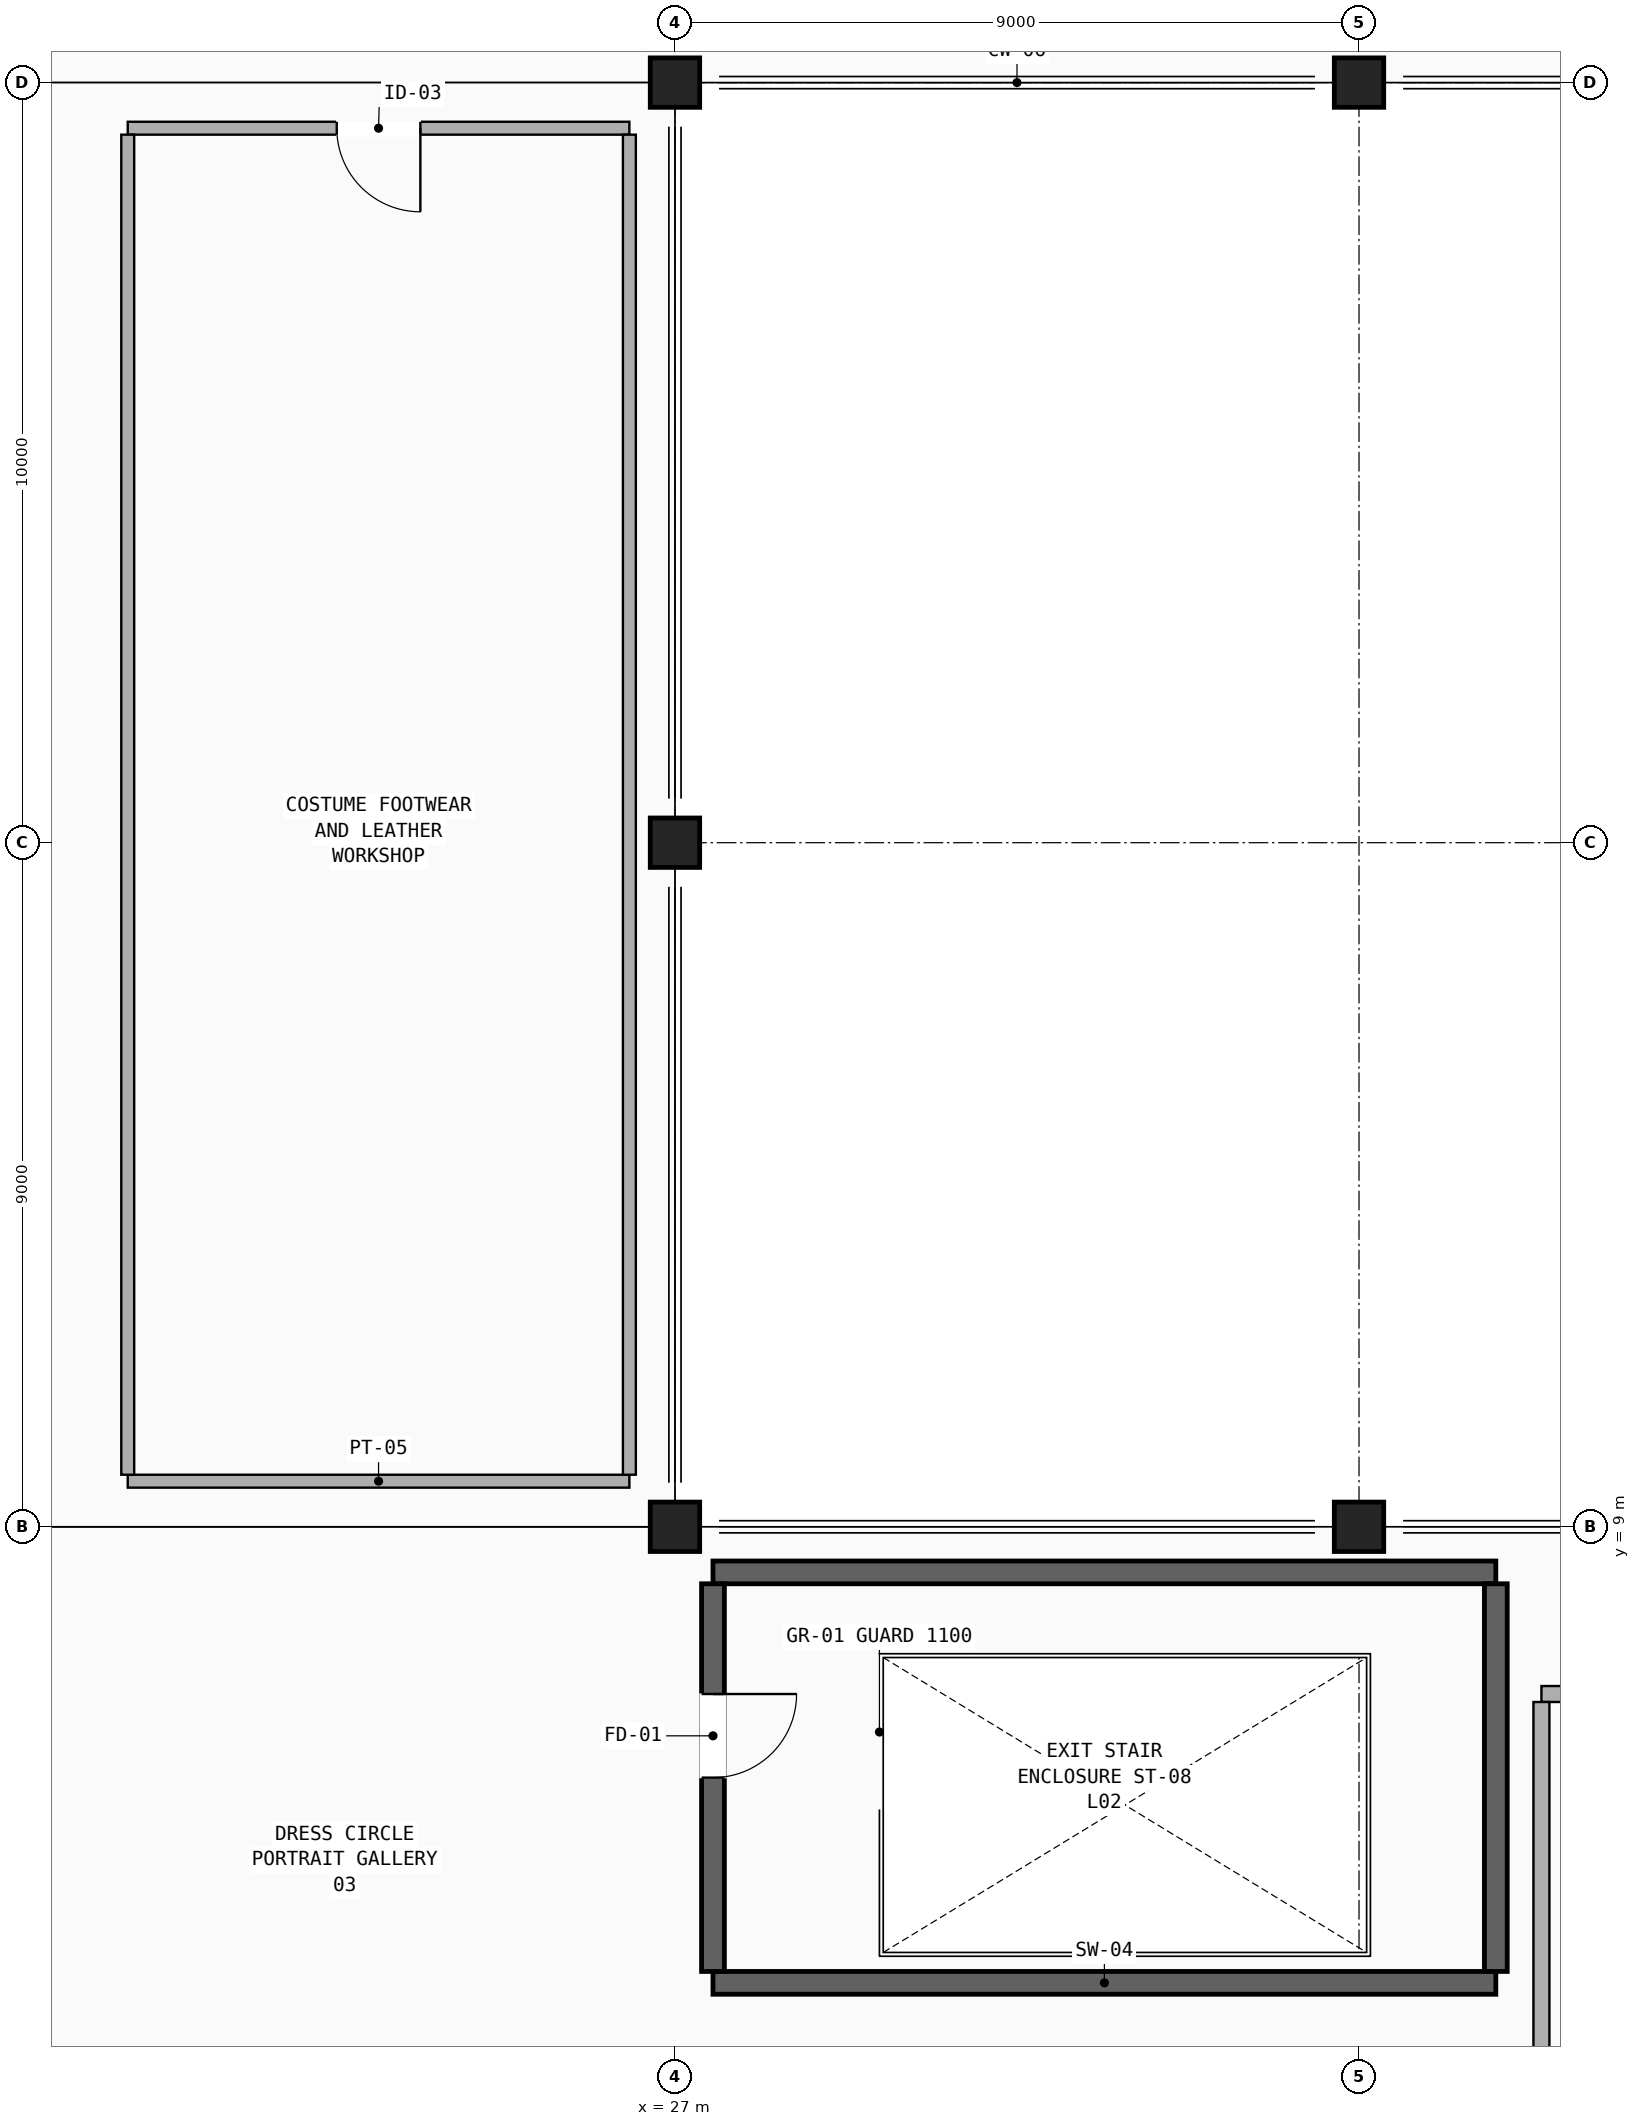
"""IFC4 building model, lengths in metres.
Left out: names, types, materials, properties, quantities, classifications, styles, units other than length and angle.
Written with IfcOpenShell. Run it as: python <this file> out.ifc"""

import sys

from ifc_helpers import new_model, si_unit, direction, frame, frame_2d, origin, origin_2d, place, context, subcontext, project, spatial, rectangle, extrude, element, fill, save


model = new_model("IFC4")
c1 = context("Model", 3, precision=1e-05, world=origin(), true_north=direction((0.0, 1.0)))
c2 = subcontext(c1, "Body", "Model", "MODEL_VIEW")
j1 = project(units=[si_unit("LENGTHUNIT", "METRE"), si_unit("PLANEANGLEUNIT", "RADIAN")], contexts=[c1])
p1 = place(None, origin())
s1 = spatial("IfcSite", under=j1, at=p1, CompositionType="ELEMENT")
p2 = place(p1, origin())
s2 = spatial("IfcBuilding", under=s1, at=p2, CompositionType="ELEMENT")
p3 = place(p2, frame((0.0, 0.0, 9.52)))
s3 = spatial("IfcBuildingStorey", under=s2, at=p3, CompositionType="ELEMENT", Elevation=9.52)
for number, where, z_axis, x_axis in (
    (1, (27.0, 9.0, 0.0), (0.0, 0.0, 1.0), (1.0, 0.0, 0.0)),
    (2, (27.0, 18.0, 0.0), (0.0, 0.0, 1.0), (1.0, 0.0, 0.0)),
    (3, (27.0, 28.0, 0.0), (0.0, 0.0, 1.0), (1.0, 0.0, 0.0)),
    (4, (36.0, 9.0, 0.0), (0.0, 0.0, 1.0), (1.0, 0.0, 0.0)),
    (5, (36.0, 28.0, 0.0), (0.0, 0.0, 1.0), (1.0, 0.0, 0.0)),
):
    element("IfcColumn", number, at=place(p3, frame(where, z_axis=z_axis, x_axis=x_axis)), inside=s3, PredefinedType="COLUMN", context=c2, shape_type="SweptSolid", body=[
        extrude(rectangle(XDim=0.65, YDim=0.65, at=origin_2d()), origin(), (0.0, 0.0, 1.0), 4.08),
    ])
for number, where, z_axis, x_axis in (
    (6, (27.5, 3.0, 0.0), (0.0, 0.0, 1.0), (1.0, 0.0, 0.0)),
    (7, (27.5, 8.4, 0.0), (0.0, 0.0, 1.0), (1.0, 0.0, 0.0)),
):
    element("IfcWall", number, at=place(p3, frame(where, z_axis=z_axis, x_axis=x_axis)), inside=s3, PredefinedType="SHEAR", context=c2, shape_type="SweptSolid", body=[
        extrude(rectangle(XDim=10.3, YDim=0.3, at=frame_2d((5.15, 0.0))), origin(), (0.0, 0.0, 1.0), 4.08),
    ])
p4 = place(p3, frame((27.5, 3.15, 0.0), z_axis=(0.0, 0.0, 1.0), x_axis=(0.0, 1.0, 0.0)))
e8 = element("IfcWall", 8, at=p4, inside=s3, PredefinedType="SHEAR", context=c2, shape_type="SweptSolid", body=[
    extrude(rectangle(XDim=5.1, YDim=0.3, at=frame_2d((2.55, 0.0))), origin(), (0.0, 0.0, 1.0), 4.08),
])
p5 = place(p4, frame((2.55, 0.0, 0.0)))
e9 = element("IfcOpeningElement", 9, at=p5, cuts=e8, PredefinedType="OPENING", context=c2, shape_type="SweptSolid", body=[
    extrude(rectangle(XDim=1.1, YDim=2.2, at=frame_2d((0.55, 1.1))), frame((0.0, 0.16, 0.0), z_axis=(0.0, -1.0, 0.0), x_axis=(1.0, 0.0, 0.0)), (0.0, 0.0, 1.0), 0.32),
])
p6 = place(p3, frame((37.8, 3.15, 0.0), z_axis=(0.0, 0.0, 1.0), x_axis=(0.0, 1.0, 0.0)))
e10 = element("IfcWall", 10, at=p6, inside=s3, PredefinedType="SHEAR", context=c2, shape_type="SweptSolid", body=[
    extrude(rectangle(XDim=5.1, YDim=0.3, at=frame_2d((2.55, 0.0))), origin(), (0.0, 0.0, 1.0), 4.08),
])
p7 = place(p3, frame((38.4, 6.8, 0.0), z_axis=(0.0, 0.0, 1.0), x_axis=(1.0, 0.0, 0.0)))
e11 = element("IfcWall", 11, at=p7, inside=s3, PredefinedType="PARTITIONING", context=c2, shape_type="SweptSolid", body=[
    extrude(rectangle(XDim=24.4, YDim=0.21, at=frame_2d((12.2, 0.0))), origin(), (0.0, 0.0, 1.0), 3.14),
])
p8 = place(p7, frame((11.6, 0.0, 0.0)))
e12 = element("IfcOpeningElement", 12, at=p8, cuts=e11, PredefinedType="OPENING", context=c2, shape_type="SweptSolid", body=[
    extrude(rectangle(XDim=1.2, YDim=2.2, at=frame_2d((0.6, 1.1))), frame((0.0, 0.115, 0.0), z_axis=(0.0, -1.0, 0.0), x_axis=(1.0, 0.0, 0.0)), (0.0, 0.0, 1.0), 0.23),
])
p9 = place(p3, frame((38.4, 0.905, 0.0), z_axis=(0.0, 0.0, 1.0), x_axis=(0.0, 1.0, 0.0)))
e13 = element("IfcWall", 13, at=p9, inside=s3, PredefinedType="PARTITIONING", context=c2, shape_type="SweptSolid", body=[
    extrude(rectangle(XDim=5.79, YDim=0.21, at=frame_2d((2.895, 0.0))), origin(), (0.0, 0.0, 1.0), 3.84),
])
p10 = place(p3, frame((19.8, 9.6, 0.0), z_axis=(0.0, 0.0, 1.0), x_axis=(1.0, 0.0, 0.0)))
e14 = element("IfcWall", 14, at=p10, inside=s3, PredefinedType="PARTITIONING", context=c2, shape_type="SweptSolid", body=[
    extrude(rectangle(XDim=6.6, YDim=0.17, at=frame_2d((3.3, 0.0))), origin(), (0.0, 0.0, 1.0), 3.84),
])
p11 = place(p3, frame((19.8, 27.4, 0.0), z_axis=(0.0, 0.0, 1.0), x_axis=(1.0, 0.0, 0.0)))
e15 = element("IfcWall", 15, at=p11, inside=s3, PredefinedType="PARTITIONING", context=c2, shape_type="SweptSolid", body=[
    extrude(rectangle(XDim=6.6, YDim=0.17, at=frame_2d((3.3, 0.0))), origin(), (0.0, 0.0, 1.0), 3.84),
])
p12 = place(p11, frame((2.75, 0.0, 0.0)))
e16 = element("IfcOpeningElement", 16, at=p12, cuts=e15, PredefinedType="OPENING", context=c2, shape_type="SweptSolid", body=[
    extrude(rectangle(XDim=1.1, YDim=2.2, at=frame_2d((0.55, 1.1))), frame((0.0, 0.095, 0.0), z_axis=(0.0, -1.0, 0.0), x_axis=(1.0, 0.0, 0.0)), (0.0, 0.0, 1.0), 0.19),
])
for number, where, z_axis, x_axis in (
    (17, (19.8, 9.685, 0.0), (0.0, 0.0, 1.0), (0.0, 1.0, 0.0)),
    (18, (26.4, 9.685, 0.0), (0.0, 0.0, 1.0), (0.0, 1.0, 0.0)),
):
    element("IfcWall", number, at=place(p3, frame(where, z_axis=z_axis, x_axis=x_axis)), inside=s3, PredefinedType="PARTITIONING", context=c2, shape_type="SweptSolid", body=[
        extrude(rectangle(XDim=17.63, YDim=0.17, at=frame_2d((8.815, 0.0))), origin(), (0.0, 0.0, 1.0), 3.07),
    ])
p13 = place(p5, frame((1.1, 0.0, 0.0), z_axis=(0.0, 0.0, 1.0), x_axis=(-1.0, 0.0, 0.0)))
e19 = element("IfcDoor", 19, at=p13, inside=s3, OperationType="SINGLE_SWING_LEFT", PredefinedType="DOOR", context=c2, shape_type="SweptSolid", body=[
    extrude(rectangle(XDim=1.1, YDim=2.2, at=frame_2d((0.55, 1.1))), frame((0.0, 0.025, 0.0), z_axis=(0.0, -1.0, 0.0), x_axis=(1.0, 0.0, 0.0)), (0.0, 0.0, 1.0), 0.05),
])
fill(e9, e19)
p14 = place(p12, frame((1.1, 0.0, 0.0), z_axis=(0.0, 0.0, 1.0), x_axis=(-1.0, 0.0, 0.0)))
e20 = element("IfcDoor", 20, at=p14, inside=s3, OperationType="SINGLE_SWING_LEFT", PredefinedType="DOOR", context=c2, shape_type="SweptSolid", body=[
    extrude(rectangle(XDim=1.1, YDim=2.2, at=frame_2d((0.55, 1.1))), frame((0.0, 0.025, 0.0), z_axis=(0.0, -1.0, 0.0), x_axis=(1.0, 0.0, 0.0)), (0.0, 0.0, 1.0), 0.05),
])
fill(e16, e20)
save(model, sys.argv[1])
